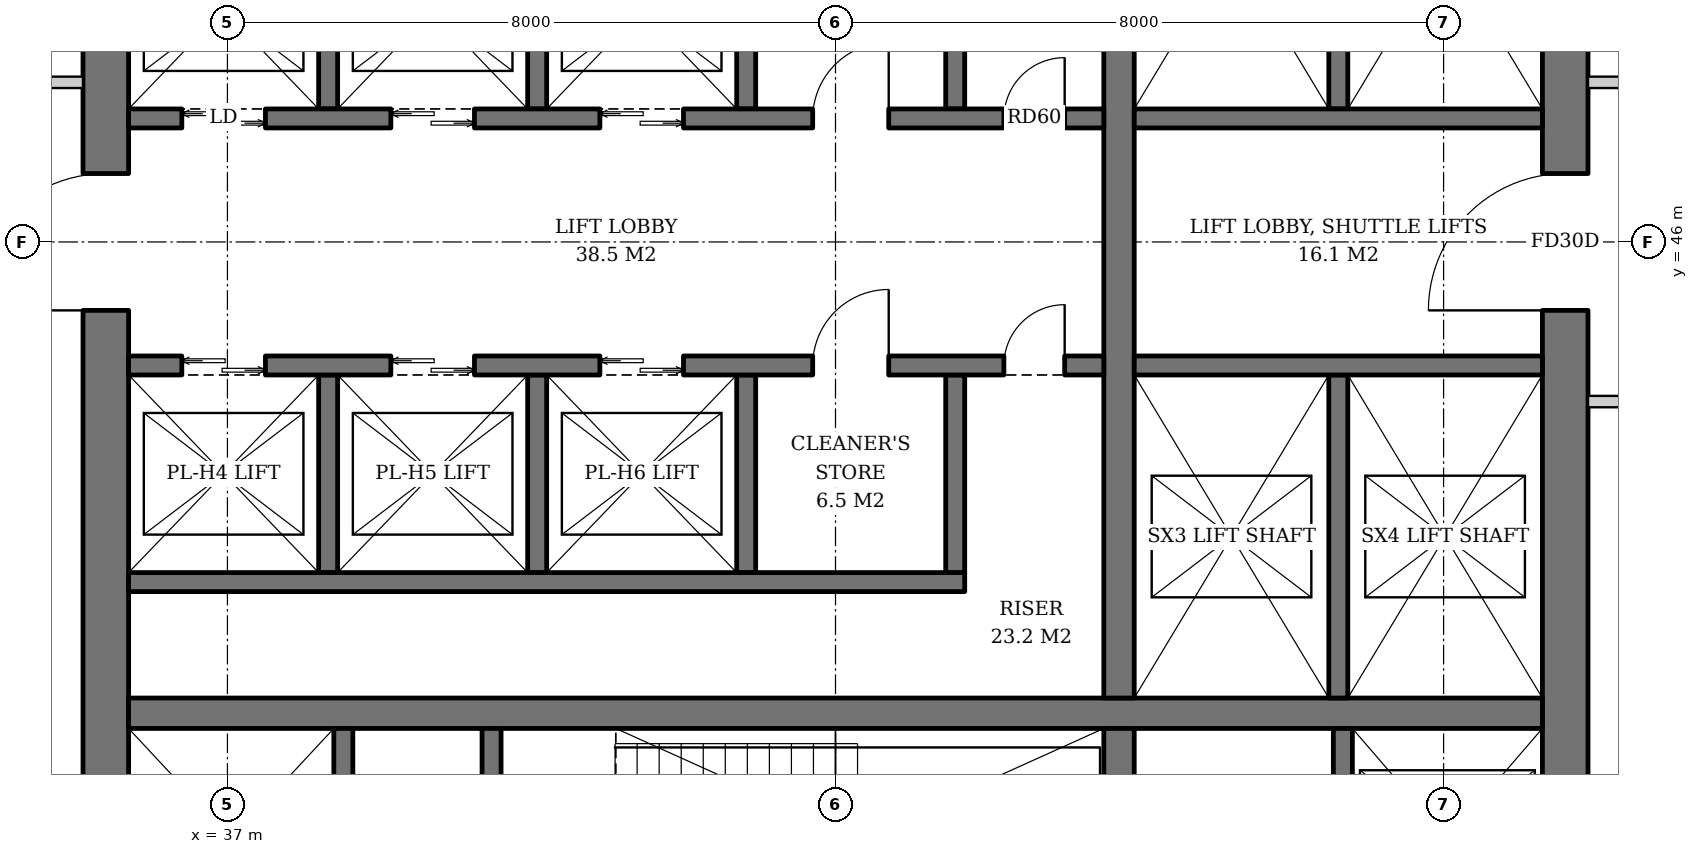
"""IFC4 building model, lengths in metres.
Left out: names, types, materials, properties, quantities, classifications, styles, units other than length and angle.
Written with IfcOpenShell. Run it as: python <this file> out.ifc"""

import sys

from ifc_helpers import new_model, si_unit, direction, frame, frame_2d, origin, place, context, subcontext, project, spatial, rectangle, extrude, element, fill, save


model = new_model("IFC4")
c1 = context("Model", 3, precision=1e-05, world=origin(), true_north=direction((0.0, 1.0)))
c2 = subcontext(c1, "Body", "Model", "MODEL_VIEW")
j1 = project(units=[si_unit("LENGTHUNIT", "METRE"), si_unit("PLANEANGLEUNIT", "RADIAN")], contexts=[c1])
p1 = place(None, origin())
s1 = spatial("IfcSite", under=j1, at=p1, CompositionType="ELEMENT")
p2 = place(p1, origin())
s2 = spatial("IfcBuilding", under=s1, at=p2, CompositionType="ELEMENT")
p3 = place(p2, frame((0.0, 0.0, 214.8)))
s3 = spatial("IfcBuildingStorey", under=s2, at=p3, CompositionType="ELEMENT", Elevation=214.8)
p4 = place(p3, frame((35.4, 36.7, 0.0), z_axis=(0.0, 0.0, 1.0), x_axis=(0.0, 1.0, 0.0)))
e1 = element("IfcWall", 1, at=p4, inside=s3, PredefinedType="SHEAR", context=c2, shape_type="SweptSolid", body=[
    extrude(rectangle(XDim=18.6, YDim=0.6, at=frame_2d((9.3, 0.0))), origin(), (0.0, 0.0, 1.0), 3.8),
])
p5 = place(p4, frame((8.4, 0.0, 0.0)))
e2 = element("IfcOpeningElement", 2, at=p5, cuts=e1, PredefinedType="OPENING", context=c2, shape_type="SweptSolid", body=[
    extrude(rectangle(XDim=1.8, YDim=2.4, at=frame_2d((0.9, 1.2))), frame((0.0, 0.31, 0.0), z_axis=(0.0, -1.0, 0.0), x_axis=(1.0, 0.0, 0.0)), (0.0, 0.0, 1.0), 0.62),
])
p6 = place(p3, frame((54.6, 36.7, 0.0), z_axis=(0.0, 0.0, 1.0), x_axis=(0.0, 1.0, 0.0)))
e3 = element("IfcWall", 3, at=p6, inside=s3, PredefinedType="SHEAR", context=c2, shape_type="SweptSolid", body=[
    extrude(rectangle(XDim=18.6, YDim=0.6, at=frame_2d((9.3, 0.0))), origin(), (0.0, 0.0, 1.0), 3.8),
])
p7 = place(p6, frame((8.4, 0.0, 0.0)))
e4 = element("IfcOpeningElement", 4, at=p7, cuts=e3, PredefinedType="OPENING", context=c2, shape_type="SweptSolid", body=[
    extrude(rectangle(XDim=1.8, YDim=2.4, at=frame_2d((0.9, 1.2))), frame((0.0, 0.31, 0.0), z_axis=(0.0, -1.0, 0.0), x_axis=(1.0, 0.0, 0.0)), (0.0, 0.0, 1.0), 0.62),
])
p8 = place(p3, frame((35.7, 39.8, 0.0), z_axis=(0.0, 0.0, 1.0), x_axis=(1.0, 0.0, 0.0)))
e5 = element("IfcWall", 5, at=p8, inside=s3, PredefinedType="SHEAR", context=c2, shape_type="SweptSolid", body=[
    extrude(rectangle(XDim=18.6, YDim=0.4, at=frame_2d((9.3, 0.0))), origin(), (0.0, 0.0, 1.0), 3.8),
])
p9 = place(p3, frame((48.73, 36.7, 0.0), z_axis=(0.0, 0.0, 1.0), x_axis=(0.0, 1.0, 0.0)))
e6 = element("IfcWall", 6, at=p9, inside=s3, PredefinedType="SHEAR", context=c2, shape_type="SweptSolid", body=[
    extrude(rectangle(XDim=2.9, YDim=0.4, at=frame_2d((1.45, 0.0))), origin(), (0.0, 0.0, 1.0), 3.8),
])
p10 = place(p3, frame((48.73, 40.0, 0.0), z_axis=(0.0, 0.0, 1.0), x_axis=(0.0, 1.0, 0.0)))
e7 = element("IfcWall", 7, at=p10, inside=s3, PredefinedType="SHEAR", context=c2, shape_type="SweptSolid", body=[
    extrude(rectangle(XDim=12.0, YDim=0.4, at=frame_2d((6.0, 0.0))), origin(), (0.0, 0.0, 1.0), 3.8),
])
p11 = place(p3, frame((38.525, 36.7, 0.0), z_axis=(0.0, 0.0, 1.0), x_axis=(0.0, 1.0, 0.0)))
e8 = element("IfcWall", 8, at=p11, inside=s3, PredefinedType="SHEAR", context=c2, shape_type="SweptSolid", body=[
    extrude(rectangle(XDim=2.9, YDim=0.25, at=frame_2d((1.45, 0.0))), origin(), (0.0, 0.0, 1.0), 3.8),
])
p12 = place(p11, frame((0.8, 0.0, 0.0)))
e9 = element("IfcOpeningElement", 9, at=p12, cuts=e8, PredefinedType="OPENING", context=c2, shape_type="SweptSolid", body=[
    extrude(rectangle(XDim=1.3, YDim=2.2, at=frame_2d((0.65, 1.1))), frame((0.0, 0.135, 0.0), z_axis=(0.0, -1.0, 0.0), x_axis=(1.0, 0.0, 0.0)), (0.0, 0.0, 1.0), 0.27),
])
p13 = place(p3, frame((40.475, 36.7, 0.0), z_axis=(0.0, 0.0, 1.0), x_axis=(0.0, 1.0, 0.0)))
e10 = element("IfcWall", 10, at=p13, inside=s3, PredefinedType="SHEAR", context=c2, shape_type="SweptSolid", body=[
    extrude(rectangle(XDim=2.9, YDim=0.25, at=frame_2d((1.45, 0.0))), origin(), (0.0, 0.0, 1.0), 3.8),
])
p14 = place(p13, frame((0.75, 0.0, 0.0)))
e11 = element("IfcOpeningElement", 11, at=p14, cuts=e10, PredefinedType="OPENING", context=c2, shape_type="SweptSolid", body=[
    extrude(rectangle(XDim=1.2, YDim=2.1, at=frame_2d((0.6, 1.05))), frame((0.0, 0.135, 0.0), z_axis=(0.0, -1.0, 0.0), x_axis=(1.0, 0.0, 0.0)), (0.0, 0.0, 1.0), 0.27),
])
p15 = place(p3, frame((51.675, 36.7, 0.0), z_axis=(0.0, 0.0, 1.0), x_axis=(0.0, 1.0, 0.0)))
e12 = element("IfcWall", 12, at=p15, inside=s3, PredefinedType="SHEAR", context=c2, shape_type="SweptSolid", body=[
    extrude(rectangle(XDim=2.9, YDim=0.25, at=frame_2d((1.45, 0.0))), origin(), (0.0, 0.0, 1.0), 3.8),
])
p16 = place(p15, frame((0.75, 0.0, 0.0)))
e13 = element("IfcOpeningElement", 13, at=p16, cuts=e12, PredefinedType="OPENING", context=c2, shape_type="SweptSolid", body=[
    extrude(rectangle(XDim=1.4, YDim=2.4, at=frame_2d((0.7, 1.2))), frame((0.0, 0.135, 0.0), z_axis=(0.0, -1.0, 0.0), x_axis=(1.0, 0.0, 0.0)), (0.0, 0.0, 1.0), 0.27),
])
for number, where, z_axis, x_axis in (
    (14, (38.325, 47.75, 0.0), (0.0, 0.0, 1.0), (0.0, 1.0, 0.0)),
    (15, (41.075, 47.75, 0.0), (0.0, 0.0, 1.0), (0.0, 1.0, 0.0)),
    (16, (43.825, 47.75, 0.0), (0.0, 0.0, 1.0), (0.0, 1.0, 0.0)),
    (17, (46.575, 47.75, 0.0), (0.0, 0.0, 1.0), (0.0, 1.0, 0.0)),
):
    element("IfcWall", number, at=place(p3, frame(where, z_axis=z_axis, x_axis=x_axis)), inside=s3, PredefinedType="SHEAR", context=c2, shape_type="SweptSolid", body=[
        extrude(rectangle(XDim=2.6, YDim=0.25, at=frame_2d((1.3, 0.0))), origin(), (0.0, 0.0, 1.0), 3.8),
    ])
p17 = place(p3, frame((35.7, 47.625, 0.0), z_axis=(0.0, 0.0, 1.0), x_axis=(1.0, 0.0, 0.0)))
e18 = element("IfcWall", 18, at=p17, inside=s3, PredefinedType="SHEAR", context=c2, shape_type="SweptSolid", body=[
    extrude(rectangle(XDim=12.83, YDim=0.25, at=frame_2d((6.415, 0.0))), origin(), (0.0, 0.0, 1.0), 3.8),
])
p18 = place(p17, frame((0.7, 0.0, 0.0)))
e19 = element("IfcOpeningElement", 19, at=p18, cuts=e18, PredefinedType="OPENING", context=c2, shape_type="SweptSolid", body=[
    extrude(rectangle(XDim=1.1, YDim=2.2, at=frame_2d((0.55, 1.1))), frame((0.0, 0.135, 0.0), z_axis=(0.0, -1.0, 0.0), x_axis=(1.0, 0.0, 0.0)), (0.0, 0.0, 1.0), 0.27),
])
p19 = place(p17, frame((3.45, 0.0, 0.0)))
e20 = element("IfcOpeningElement", 20, at=p19, cuts=e18, PredefinedType="OPENING", context=c2, shape_type="SweptSolid", body=[
    extrude(rectangle(XDim=1.1, YDim=2.2, at=frame_2d((0.55, 1.1))), frame((0.0, 0.135, 0.0), z_axis=(0.0, -1.0, 0.0), x_axis=(1.0, 0.0, 0.0)), (0.0, 0.0, 1.0), 0.27),
])
p20 = place(p17, frame((6.2, 0.0, 0.0)))
e21 = element("IfcOpeningElement", 21, at=p20, cuts=e18, PredefinedType="OPENING", context=c2, shape_type="SweptSolid", body=[
    extrude(rectangle(XDim=1.1, YDim=2.2, at=frame_2d((0.55, 1.1))), frame((0.0, 0.135, 0.0), z_axis=(0.0, -1.0, 0.0), x_axis=(1.0, 0.0, 0.0)), (0.0, 0.0, 1.0), 0.27),
])
p21 = place(p17, frame((9.0, 0.0, 0.0)))
e22 = element("IfcOpeningElement", 22, at=p21, cuts=e18, PredefinedType="OPENING", context=c2, shape_type="SweptSolid", body=[
    extrude(rectangle(XDim=1.0, YDim=2.1, at=frame_2d((0.5, 1.05))), frame((0.0, 0.135, 0.0), z_axis=(0.0, -1.0, 0.0), x_axis=(1.0, 0.0, 0.0)), (0.0, 0.0, 1.0), 0.27),
])
p22 = place(p17, frame((11.515, 0.0, 0.0)))
e23 = element("IfcOpeningElement", 23, at=p22, cuts=e18, PredefinedType="OPENING", context=c2, shape_type="SweptSolid", body=[
    extrude(rectangle(XDim=0.8, YDim=2.0, at=frame_2d((0.4, 1.0))), frame((0.0, 0.135, 0.0), z_axis=(0.0, -1.0, 0.0), x_axis=(1.0, 0.0, 0.0)), (0.0, 0.0, 1.0), 0.27),
])
for number, where, z_axis, x_axis in (
    (24, (38.325, 44.25, 0.0), (0.0, 0.0, 1.0), (0.0, -1.0, 0.0)),
    (25, (41.075, 44.25, 0.0), (0.0, 0.0, 1.0), (0.0, -1.0, 0.0)),
    (26, (43.825, 44.25, 0.0), (0.0, 0.0, 1.0), (0.0, -1.0, 0.0)),
    (27, (46.575, 44.25, 0.0), (0.0, 0.0, 1.0), (0.0, -1.0, 0.0)),
):
    element("IfcWall", number, at=place(p3, frame(where, z_axis=z_axis, x_axis=x_axis)), inside=s3, PredefinedType="SHEAR", context=c2, shape_type="SweptSolid", body=[
        extrude(rectangle(XDim=2.6, YDim=0.25, at=frame_2d((1.3, 0.0))), origin(), (0.0, 0.0, 1.0), 3.8),
    ])
p23 = place(p3, frame((35.7, 41.525, 0.0), z_axis=(0.0, 0.0, 1.0), x_axis=(1.0, 0.0, 0.0)))
e28 = element("IfcWall", 28, at=p23, inside=s3, PredefinedType="SHEAR", context=c2, shape_type="SweptSolid", body=[
    extrude(rectangle(XDim=11.0, YDim=0.25, at=frame_2d((5.5, 0.0))), origin(), (0.0, 0.0, 1.0), 3.8),
])
p24 = place(p3, frame((35.7, 44.375, 0.0), z_axis=(0.0, 0.0, 1.0), x_axis=(1.0, 0.0, 0.0)))
e29 = element("IfcWall", 29, at=p24, inside=s3, PredefinedType="SHEAR", context=c2, shape_type="SweptSolid", body=[
    extrude(rectangle(XDim=12.83, YDim=0.25, at=frame_2d((6.415, 0.0))), origin(), (0.0, 0.0, 1.0), 3.8),
])
p25 = place(p24, frame((0.7, 0.0, 0.0)))
e30 = element("IfcOpeningElement", 30, at=p25, cuts=e29, PredefinedType="OPENING", context=c2, shape_type="SweptSolid", body=[
    extrude(rectangle(XDim=1.1, YDim=2.2, at=frame_2d((0.55, 1.1))), frame((0.0, 0.135, 0.0), z_axis=(0.0, -1.0, 0.0), x_axis=(1.0, 0.0, 0.0)), (0.0, 0.0, 1.0), 0.27),
])
p26 = place(p24, frame((3.45, 0.0, 0.0)))
e31 = element("IfcOpeningElement", 31, at=p26, cuts=e29, PredefinedType="OPENING", context=c2, shape_type="SweptSolid", body=[
    extrude(rectangle(XDim=1.1, YDim=2.2, at=frame_2d((0.55, 1.1))), frame((0.0, 0.135, 0.0), z_axis=(0.0, -1.0, 0.0), x_axis=(1.0, 0.0, 0.0)), (0.0, 0.0, 1.0), 0.27),
])
p27 = place(p24, frame((6.2, 0.0, 0.0)))
e32 = element("IfcOpeningElement", 32, at=p27, cuts=e29, PredefinedType="OPENING", context=c2, shape_type="SweptSolid", body=[
    extrude(rectangle(XDim=1.1, YDim=2.2, at=frame_2d((0.55, 1.1))), frame((0.0, 0.135, 0.0), z_axis=(0.0, -1.0, 0.0), x_axis=(1.0, 0.0, 0.0)), (0.0, 0.0, 1.0), 0.27),
])
p28 = place(p24, frame((9.0, 0.0, 0.0)))
e33 = element("IfcOpeningElement", 33, at=p28, cuts=e29, PredefinedType="OPENING", context=c2, shape_type="SweptSolid", body=[
    extrude(rectangle(XDim=1.0, YDim=2.1, at=frame_2d((0.5, 1.05))), frame((0.0, 0.135, 0.0), z_axis=(0.0, -1.0, 0.0), x_axis=(1.0, 0.0, 0.0)), (0.0, 0.0, 1.0), 0.27),
])
p29 = place(p24, frame((11.515, 0.0, 0.0)))
e34 = element("IfcOpeningElement", 34, at=p29, cuts=e29, PredefinedType="OPENING", context=c2, shape_type="SweptSolid", body=[
    extrude(rectangle(XDim=0.8, YDim=2.0, at=frame_2d((0.4, 1.0))), frame((0.0, 0.135, 0.0), z_axis=(0.0, -1.0, 0.0), x_axis=(1.0, 0.0, 0.0)), (0.0, 0.0, 1.0), 0.27),
])
p30 = place(p3, frame((51.615, 47.75, 0.0), z_axis=(0.0, 0.0, 1.0), x_axis=(0.0, 1.0, 0.0)))
e35 = element("IfcWall", 35, at=p30, inside=s3, PredefinedType="SHEAR", context=c2, shape_type="SweptSolid", body=[
    extrude(rectangle(XDim=4.25, YDim=0.25, at=frame_2d((2.125, 0.0))), origin(), (0.0, 0.0, 1.0), 3.8),
])
p31 = place(p3, frame((48.93, 47.625, 0.0), z_axis=(0.0, 0.0, 1.0), x_axis=(1.0, 0.0, 0.0)))
e36 = element("IfcWall", 36, at=p31, inside=s3, PredefinedType="SHEAR", context=c2, shape_type="SweptSolid", body=[
    extrude(rectangle(XDim=5.37, YDim=0.25, at=frame_2d((2.685, 0.0))), origin(), (0.0, 0.0, 1.0), 3.8),
])
p32 = place(p3, frame((51.615, 44.25, 0.0), z_axis=(0.0, 0.0, 1.0), x_axis=(0.0, -1.0, 0.0)))
e37 = element("IfcWall", 37, at=p32, inside=s3, PredefinedType="SHEAR", context=c2, shape_type="SweptSolid", body=[
    extrude(rectangle(XDim=4.25, YDim=0.25, at=frame_2d((2.125, 0.0))), origin(), (0.0, 0.0, 1.0), 3.8),
])
p33 = place(p3, frame((48.93, 44.375, 0.0), z_axis=(0.0, 0.0, 1.0), x_axis=(1.0, 0.0, 0.0)))
e38 = element("IfcWall", 38, at=p33, inside=s3, PredefinedType="SHEAR", context=c2, shape_type="SweptSolid", body=[
    extrude(rectangle(XDim=5.37, YDim=0.25, at=frame_2d((2.685, 0.0))), origin(), (0.0, 0.0, 1.0), 3.8),
])
for number, where, z_axis, x_axis in (
    (39, (54.9, 43.9, 0.0), (0.0, 0.0, 1.0), (1.0, 0.0, 0.0)),
    (40, (54.9, 48.1, 0.0), (0.0, 0.0, 1.0), (1.0, 0.0, 0.0)),
    (41, (35.1, 48.1, 0.0), (0.0, 0.0, 1.0), (-1.0, 0.0, 0.0)),
):
    element("IfcWall", number, at=place(p3, frame(where, z_axis=z_axis, x_axis=x_axis)), inside=s3, PredefinedType="PARTITIONING", context=c2, shape_type="SweptSolid", body=[
        extrude(rectangle(XDim=2.325, YDim=0.15, at=frame_2d((1.163, 0.0))), origin(), (0.0, 0.0, 1.0), 3.62),
    ])
p34 = place(p18, origin())
e42 = element("IfcDoor", 42, at=p34, inside=s3, OperationType="DOUBLE_DOOR_SLIDING", PredefinedType="DOOR", context=c2, shape_type="SweptSolid", body=[
    extrude(rectangle(XDim=1.1, YDim=2.2, at=frame_2d((0.55, 1.1))), frame((0.0, 0.025, 0.0), z_axis=(0.0, -1.0, 0.0), x_axis=(1.0, 0.0, 0.0)), (0.0, 0.0, 1.0), 0.05),
])
fill(e19, e42)
p35 = place(p19, origin())
e43 = element("IfcDoor", 43, at=p35, inside=s3, OperationType="DOUBLE_DOOR_SLIDING", PredefinedType="DOOR", context=c2, shape_type="SweptSolid", body=[
    extrude(rectangle(XDim=1.1, YDim=2.2, at=frame_2d((0.55, 1.1))), frame((0.0, 0.025, 0.0), z_axis=(0.0, -1.0, 0.0), x_axis=(1.0, 0.0, 0.0)), (0.0, 0.0, 1.0), 0.05),
])
fill(e20, e43)
p36 = place(p20, origin())
e44 = element("IfcDoor", 44, at=p36, inside=s3, OperationType="DOUBLE_DOOR_SLIDING", PredefinedType="DOOR", context=c2, shape_type="SweptSolid", body=[
    extrude(rectangle(XDim=1.1, YDim=2.2, at=frame_2d((0.55, 1.1))), frame((0.0, 0.025, 0.0), z_axis=(0.0, -1.0, 0.0), x_axis=(1.0, 0.0, 0.0)), (0.0, 0.0, 1.0), 0.05),
])
fill(e21, e44)
p37 = place(p21, origin())
e45 = element("IfcDoor", 45, at=p37, inside=s3, OperationType="SINGLE_SWING_RIGHT", PredefinedType="DOOR", context=c2, shape_type="SweptSolid", body=[
    extrude(rectangle(XDim=1.0, YDim=2.1, at=frame_2d((0.5, 1.05))), frame((0.0, 0.025, 0.0), z_axis=(0.0, -1.0, 0.0), x_axis=(1.0, 0.0, 0.0)), (0.0, 0.0, 1.0), 0.05),
])
fill(e22, e45)
p38 = place(p22, origin())
e46 = element("IfcDoor", 46, at=p38, inside=s3, OperationType="SINGLE_SWING_RIGHT", PredefinedType="DOOR", context=c2, shape_type="SweptSolid", body=[
    extrude(rectangle(XDim=0.8, YDim=2.0, at=frame_2d((0.4, 1.0))), frame((0.0, 0.025, 0.0), z_axis=(0.0, -1.0, 0.0), x_axis=(1.0, 0.0, 0.0)), (0.0, 0.0, 1.0), 0.05),
])
fill(e23, e46)
p39 = place(p25, origin())
e47 = element("IfcDoor", 47, at=p39, inside=s3, OperationType="DOUBLE_DOOR_SLIDING", PredefinedType="DOOR", context=c2, shape_type="SweptSolid", body=[
    extrude(rectangle(XDim=1.1, YDim=2.2, at=frame_2d((0.55, 1.1))), frame((0.0, 0.025, 0.0), z_axis=(0.0, -1.0, 0.0), x_axis=(1.0, 0.0, 0.0)), (0.0, 0.0, 1.0), 0.05),
])
fill(e30, e47)
p40 = place(p26, origin())
e48 = element("IfcDoor", 48, at=p40, inside=s3, OperationType="DOUBLE_DOOR_SLIDING", PredefinedType="DOOR", context=c2, shape_type="SweptSolid", body=[
    extrude(rectangle(XDim=1.1, YDim=2.2, at=frame_2d((0.55, 1.1))), frame((0.0, 0.025, 0.0), z_axis=(0.0, -1.0, 0.0), x_axis=(1.0, 0.0, 0.0)), (0.0, 0.0, 1.0), 0.05),
])
fill(e31, e48)
p41 = place(p27, origin())
e49 = element("IfcDoor", 49, at=p41, inside=s3, OperationType="DOUBLE_DOOR_SLIDING", PredefinedType="DOOR", context=c2, shape_type="SweptSolid", body=[
    extrude(rectangle(XDim=1.1, YDim=2.2, at=frame_2d((0.55, 1.1))), frame((0.0, 0.025, 0.0), z_axis=(0.0, -1.0, 0.0), x_axis=(1.0, 0.0, 0.0)), (0.0, 0.0, 1.0), 0.05),
])
fill(e32, e49)
p42 = place(p28, origin())
e50 = element("IfcDoor", 50, at=p42, inside=s3, OperationType="SINGLE_SWING_RIGHT", PredefinedType="DOOR", context=c2, shape_type="SweptSolid", body=[
    extrude(rectangle(XDim=1.0, YDim=2.1, at=frame_2d((0.5, 1.05))), frame((0.0, 0.025, 0.0), z_axis=(0.0, -1.0, 0.0), x_axis=(1.0, 0.0, 0.0)), (0.0, 0.0, 1.0), 0.05),
])
fill(e33, e50)
p43 = place(p29, origin())
e51 = element("IfcDoor", 51, at=p43, inside=s3, OperationType="SINGLE_SWING_RIGHT", PredefinedType="DOOR", context=c2, shape_type="SweptSolid", body=[
    extrude(rectangle(XDim=0.8, YDim=2.0, at=frame_2d((0.4, 1.0))), frame((0.0, 0.025, 0.0), z_axis=(0.0, -1.0, 0.0), x_axis=(1.0, 0.0, 0.0)), (0.0, 0.0, 1.0), 0.05),
])
fill(e34, e51)
p44 = place(p5, origin())
e52 = element("IfcDoor", 52, at=p44, inside=s3, OperationType="DOUBLE_DOOR_SINGLE_SWING", PredefinedType="DOOR", context=c2, shape_type="SweptSolid", body=[
    extrude(rectangle(XDim=1.8, YDim=2.4, at=frame_2d((0.9, 1.2))), frame((0.0, 0.025, 0.0), z_axis=(0.0, -1.0, 0.0), x_axis=(1.0, 0.0, 0.0)), (0.0, 0.0, 1.0), 0.05),
])
fill(e2, e52)
p45 = place(p7, origin())
e53 = element("IfcDoor", 53, at=p45, inside=s3, OperationType="DOUBLE_DOOR_SINGLE_SWING", PredefinedType="DOOR", context=c2, shape_type="SweptSolid", body=[
    extrude(rectangle(XDim=1.8, YDim=2.4, at=frame_2d((0.9, 1.2))), frame((0.0, 0.025, 0.0), z_axis=(0.0, -1.0, 0.0), x_axis=(1.0, 0.0, 0.0)), (0.0, 0.0, 1.0), 0.05),
])
fill(e4, e53)
save(model, sys.argv[1])
